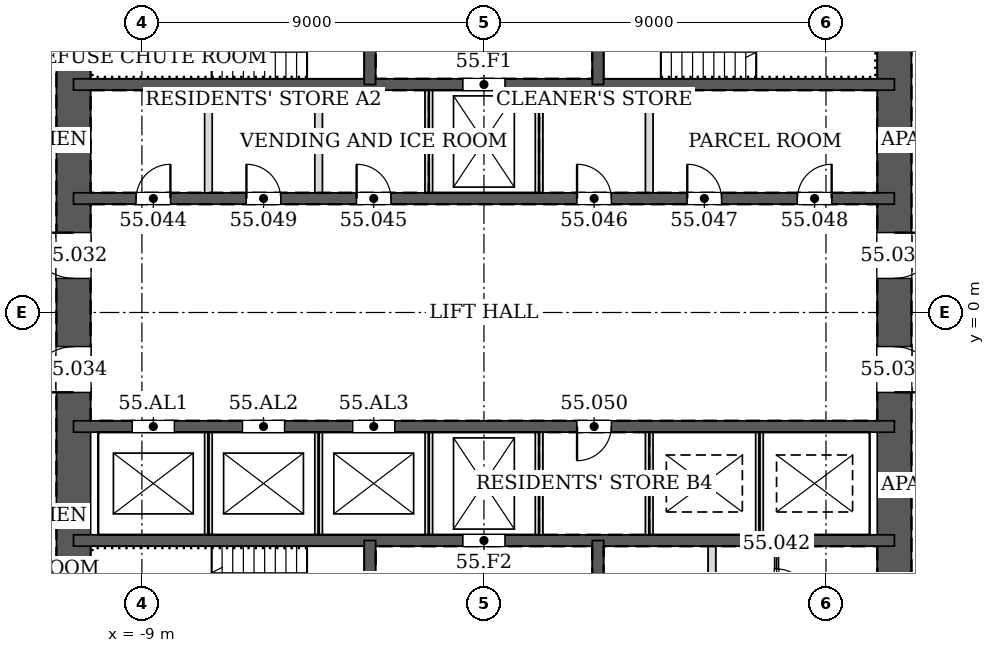
"""IFC4 building model, lengths in metres.
Left out: names, types, materials, properties, quantities, classifications, styles, units other than length and angle.
Written with IfcOpenShell. Run it as: python <this file> out.ifc"""

import sys

from ifc_helpers import new_model, si_unit, direction, frame, frame_2d, origin, place, context, subcontext, project, spatial, rectangle, extrude, element, fill, save


model = new_model("IFC4")
c1 = context("Model", 3, precision=1e-05, world=origin(), true_north=direction((0.0, 1.0)))
c2 = subcontext(c1, "Body", "Model", "MODEL_VIEW")
j1 = project(units=[si_unit("LENGTHUNIT", "METRE"), si_unit("PLANEANGLEUNIT", "RADIAN")], contexts=[c1])
p1 = place(None, origin())
s1 = spatial("IfcSite", under=j1, at=p1, CompositionType="ELEMENT")
p2 = place(p1, origin())
s2 = spatial("IfcBuilding", under=s1, at=p2, CompositionType="ELEMENT")
p3 = place(p2, frame((0.0, 0.0, 234.6)))
s3 = spatial("IfcBuildingStorey", under=s2, at=p3, CompositionType="ELEMENT", Elevation=234.6)
p4 = place(p3, frame((10.8, -10.8, 0.0), z_axis=(0.0, 0.0, 1.0), x_axis=(0.0, 1.0, 0.0)))
e1 = element("IfcWall", 1, at=p4, inside=s3, PredefinedType="SOLIDWALL", context=c2, shape_type="SweptSolid", body=[
    extrude(rectangle(XDim=21.6, YDim=0.9, at=frame_2d((10.8, 0.0))), origin(), (0.0, 0.0, 1.0), 3.4),
])
p5 = place(p4, frame((11.7, 0.0, 0.0)))
e2 = element("IfcOpeningElement", 2, at=p5, cuts=e1, PredefinedType="OPENING", context=c2, shape_type="SweptSolid", body=[
    extrude(rectangle(XDim=1.2, YDim=2.1, at=frame_2d((0.6, 1.05))), frame((0.0, 0.46, 0.0), z_axis=(0.0, -1.0, 0.0), x_axis=(1.0, 0.0, 0.0)), (0.0, 0.0, 1.0), 0.92),
])
p6 = place(p4, frame((8.7, 0.0, 0.0)))
e3 = element("IfcOpeningElement", 3, at=p6, cuts=e1, PredefinedType="OPENING", context=c2, shape_type="SweptSolid", body=[
    extrude(rectangle(XDim=1.2, YDim=2.1, at=frame_2d((0.6, 1.05))), frame((0.0, 0.46, 0.0), z_axis=(0.0, -1.0, 0.0), x_axis=(1.0, 0.0, 0.0)), (0.0, 0.0, 1.0), 0.92),
])
p7 = place(p3, frame((-10.8, 10.8, 0.0), z_axis=(0.0, 0.0, 1.0), x_axis=(0.0, -1.0, 0.0)))
e4 = element("IfcWall", 4, at=p7, inside=s3, PredefinedType="SOLIDWALL", context=c2, shape_type="SweptSolid", body=[
    extrude(rectangle(XDim=21.6, YDim=0.9, at=frame_2d((10.8, 0.0))), origin(), (0.0, 0.0, 1.0), 3.4),
])
p8 = place(p7, frame((8.7, 0.0, 0.0)))
e5 = element("IfcOpeningElement", 5, at=p8, cuts=e4, PredefinedType="OPENING", context=c2, shape_type="SweptSolid", body=[
    extrude(rectangle(XDim=1.2, YDim=2.1, at=frame_2d((0.6, 1.05))), frame((0.0, 0.46, 0.0), z_axis=(0.0, -1.0, 0.0), x_axis=(1.0, 0.0, 0.0)), (0.0, 0.0, 1.0), 0.92),
])
p9 = place(p7, frame((11.7, 0.0, 0.0)))
e6 = element("IfcOpeningElement", 6, at=p9, cuts=e4, PredefinedType="OPENING", context=c2, shape_type="SweptSolid", body=[
    extrude(rectangle(XDim=1.2, YDim=2.1, at=frame_2d((0.6, 1.05))), frame((0.0, 0.46, 0.0), z_axis=(0.0, -1.0, 0.0), x_axis=(1.0, 0.0, 0.0)), (0.0, 0.0, 1.0), 0.92),
])
p10 = place(p3, frame((-10.8, 3.0, 0.0), z_axis=(0.0, 0.0, 1.0), x_axis=(1.0, 0.0, 0.0)))
e7 = element("IfcWall", 7, at=p10, inside=s3, PredefinedType="SOLIDWALL", context=c2, shape_type="SweptSolid", body=[
    extrude(rectangle(XDim=21.6, YDim=0.3, at=frame_2d((10.8, 0.0))), origin(), (0.0, 0.0, 1.0), 3.4),
])
p11 = place(p10, frame((1.65, 0.0, 0.0)))
e8 = element("IfcOpeningElement", 8, at=p11, cuts=e7, PredefinedType="OPENING", context=c2, shape_type="SweptSolid", body=[
    extrude(rectangle(XDim=0.9, YDim=2.1, at=frame_2d((0.45, 1.05))), frame((0.0, 0.16, 0.0), z_axis=(0.0, -1.0, 0.0), x_axis=(1.0, 0.0, 0.0)), (0.0, 0.0, 1.0), 0.32),
])
p12 = place(p10, frame((7.45, 0.0, 0.0)))
e9 = element("IfcOpeningElement", 9, at=p12, cuts=e7, PredefinedType="OPENING", context=c2, shape_type="SweptSolid", body=[
    extrude(rectangle(XDim=0.9, YDim=2.1, at=frame_2d((0.45, 1.05))), frame((0.0, 0.16, 0.0), z_axis=(0.0, -1.0, 0.0), x_axis=(1.0, 0.0, 0.0)), (0.0, 0.0, 1.0), 0.32),
])
p13 = place(p10, frame((13.25, 0.0, 0.0)))
e10 = element("IfcOpeningElement", 10, at=p13, cuts=e7, PredefinedType="OPENING", context=c2, shape_type="SweptSolid", body=[
    extrude(rectangle(XDim=0.9, YDim=2.1, at=frame_2d((0.45, 1.05))), frame((0.0, 0.16, 0.0), z_axis=(0.0, -1.0, 0.0), x_axis=(1.0, 0.0, 0.0)), (0.0, 0.0, 1.0), 0.32),
])
p14 = place(p10, frame((16.15, 0.0, 0.0)))
e11 = element("IfcOpeningElement", 11, at=p14, cuts=e7, PredefinedType="OPENING", context=c2, shape_type="SweptSolid", body=[
    extrude(rectangle(XDim=0.9, YDim=2.1, at=frame_2d((0.45, 1.05))), frame((0.0, 0.16, 0.0), z_axis=(0.0, -1.0, 0.0), x_axis=(1.0, 0.0, 0.0)), (0.0, 0.0, 1.0), 0.32),
])
p15 = place(p10, frame((19.05, 0.0, 0.0)))
e12 = element("IfcOpeningElement", 12, at=p15, cuts=e7, PredefinedType="OPENING", context=c2, shape_type="SweptSolid", body=[
    extrude(rectangle(XDim=0.9, YDim=2.1, at=frame_2d((0.45, 1.05))), frame((0.0, 0.16, 0.0), z_axis=(0.0, -1.0, 0.0), x_axis=(1.0, 0.0, 0.0)), (0.0, 0.0, 1.0), 0.32),
])
p16 = place(p10, frame((4.55, 0.0, 0.0)))
e13 = element("IfcOpeningElement", 13, at=p16, cuts=e7, PredefinedType="OPENING", context=c2, shape_type="SweptSolid", body=[
    extrude(rectangle(XDim=0.9, YDim=2.1, at=frame_2d((0.45, 1.05))), frame((0.0, 0.16, 0.0), z_axis=(0.0, -1.0, 0.0), x_axis=(1.0, 0.0, 0.0)), (0.0, 0.0, 1.0), 0.32),
])
p17 = place(p3, frame((-10.8, 6.0, 0.0), z_axis=(0.0, 0.0, 1.0), x_axis=(1.0, 0.0, 0.0)))
e14 = element("IfcWall", 14, at=p17, inside=s3, PredefinedType="SOLIDWALL", context=c2, shape_type="SweptSolid", body=[
    extrude(rectangle(XDim=21.6, YDim=0.3, at=frame_2d((10.8, 0.0))), origin(), (0.0, 0.0, 1.0), 3.4),
])
p18 = place(p17, frame((10.25, 0.0, 0.0)))
e15 = element("IfcOpeningElement", 15, at=p18, cuts=e14, PredefinedType="OPENING", context=c2, shape_type="SweptSolid", body=[
    extrude(rectangle(XDim=1.1, YDim=2.1, at=frame_2d((0.55, 1.05))), frame((0.0, 0.16, 0.0), z_axis=(0.0, -1.0, 0.0), x_axis=(1.0, 0.0, 0.0)), (0.0, 0.0, 1.0), 0.32),
])
p19 = place(p3, frame((-3.0, 6.0, 0.0), z_axis=(0.0, 0.0, 1.0), x_axis=(0.0, 1.0, 0.0)))
e16 = element("IfcWall", 16, at=p19, inside=s3, PredefinedType="SOLIDWALL", context=c2, shape_type="SweptSolid", body=[
    extrude(rectangle(XDim=4.8, YDim=0.3, at=frame_2d((2.4, 0.0))), origin(), (0.0, 0.0, 1.0), 3.4),
])
p20 = place(p19, frame((1.75, 0.0, 0.0)))
e17 = element("IfcOpeningElement", 17, at=p20, cuts=e16, PredefinedType="OPENING", context=c2, shape_type="SweptSolid", body=[
    extrude(rectangle(XDim=1.0, YDim=2.1, at=frame_2d((0.5, 1.05))), frame((0.0, 0.16, 0.0), z_axis=(0.0, -1.0, 0.0), x_axis=(1.0, 0.0, 0.0)), (0.0, 0.0, 1.0), 0.32),
])
p21 = place(p3, frame((3.0, 6.0, 0.0), z_axis=(0.0, 0.0, 1.0), x_axis=(0.0, 1.0, 0.0)))
e18 = element("IfcWall", 18, at=p21, inside=s3, PredefinedType="SOLIDWALL", context=c2, shape_type="SweptSolid", body=[
    extrude(rectangle(XDim=4.8, YDim=0.3, at=frame_2d((2.4, 0.0))), origin(), (0.0, 0.0, 1.0), 3.4),
])
p22 = place(p21, frame((1.75, 0.0, 0.0)))
e19 = element("IfcOpeningElement", 19, at=p22, cuts=e18, PredefinedType="OPENING", context=c2, shape_type="SweptSolid", body=[
    extrude(rectangle(XDim=1.0, YDim=2.1, at=frame_2d((0.5, 1.05))), frame((0.0, 0.16, 0.0), z_axis=(0.0, -1.0, 0.0), x_axis=(1.0, 0.0, 0.0)), (0.0, 0.0, 1.0), 0.32),
])
p23 = place(p3, frame((-10.8, -3.0, 0.0), z_axis=(0.0, 0.0, 1.0), x_axis=(1.0, 0.0, 0.0)))
e20 = element("IfcWall", 20, at=p23, inside=s3, PredefinedType="SOLIDWALL", context=c2, shape_type="SweptSolid", body=[
    extrude(rectangle(XDim=21.6, YDim=0.3, at=frame_2d((10.8, 0.0))), origin(), (0.0, 0.0, 1.0), 3.4),
])
p24 = place(p23, frame((13.25, 0.0, 0.0)))
e21 = element("IfcOpeningElement", 21, at=p24, cuts=e20, PredefinedType="OPENING", context=c2, shape_type="SweptSolid", body=[
    extrude(rectangle(XDim=0.9, YDim=2.1, at=frame_2d((0.45, 1.05))), frame((0.0, 0.16, 0.0), z_axis=(0.0, -1.0, 0.0), x_axis=(1.0, 0.0, 0.0)), (0.0, 0.0, 1.0), 0.32),
])
p25 = place(p23, frame((1.55, 0.0, 0.0)))
e22 = element("IfcOpeningElement", 22, at=p25, cuts=e20, PredefinedType="OPENING", context=c2, shape_type="SweptSolid", body=[
    extrude(rectangle(XDim=1.1, YDim=2.1, at=frame_2d((0.55, 1.05))), frame((0.0, 0.16, 0.0), z_axis=(0.0, -1.0, 0.0), x_axis=(1.0, 0.0, 0.0)), (0.0, 0.0, 1.0), 0.32),
])
p26 = place(p23, frame((4.45, 0.0, 0.0)))
e23 = element("IfcOpeningElement", 23, at=p26, cuts=e20, PredefinedType="OPENING", context=c2, shape_type="SweptSolid", body=[
    extrude(rectangle(XDim=1.1, YDim=2.1, at=frame_2d((0.55, 1.05))), frame((0.0, 0.16, 0.0), z_axis=(0.0, -1.0, 0.0), x_axis=(1.0, 0.0, 0.0)), (0.0, 0.0, 1.0), 0.32),
])
p27 = place(p23, frame((7.35, 0.0, 0.0)))
e24 = element("IfcOpeningElement", 24, at=p27, cuts=e20, PredefinedType="OPENING", context=c2, shape_type="SweptSolid", body=[
    extrude(rectangle(XDim=1.1, YDim=2.1, at=frame_2d((0.55, 1.05))), frame((0.0, 0.16, 0.0), z_axis=(0.0, -1.0, 0.0), x_axis=(1.0, 0.0, 0.0)), (0.0, 0.0, 1.0), 0.32),
])
p28 = place(p3, frame((-10.8, -6.0, 0.0), z_axis=(0.0, 0.0, 1.0), x_axis=(1.0, 0.0, 0.0)))
e25 = element("IfcWall", 25, at=p28, inside=s3, PredefinedType="SOLIDWALL", context=c2, shape_type="SweptSolid", body=[
    extrude(rectangle(XDim=21.6, YDim=0.3, at=frame_2d((10.8, 0.0))), origin(), (0.0, 0.0, 1.0), 3.4),
])
p29 = place(p28, frame((10.25, 0.0, 0.0)))
e26 = element("IfcOpeningElement", 26, at=p29, cuts=e25, PredefinedType="OPENING", context=c2, shape_type="SweptSolid", body=[
    extrude(rectangle(XDim=1.1, YDim=2.1, at=frame_2d((0.55, 1.05))), frame((0.0, 0.16, 0.0), z_axis=(0.0, -1.0, 0.0), x_axis=(1.0, 0.0, 0.0)), (0.0, 0.0, 1.0), 0.32),
])
p30 = place(p3, frame((-3.0, -6.0, 0.0), z_axis=(0.0, 0.0, 1.0), x_axis=(0.0, -1.0, 0.0)))
e27 = element("IfcWall", 27, at=p30, inside=s3, PredefinedType="SOLIDWALL", context=c2, shape_type="SweptSolid", body=[
    extrude(rectangle(XDim=4.8, YDim=0.3, at=frame_2d((2.4, 0.0))), origin(), (0.0, 0.0, 1.0), 3.4),
])
p31 = place(p30, frame((1.75, 0.0, 0.0)))
e28 = element("IfcOpeningElement", 28, at=p31, cuts=e27, PredefinedType="OPENING", context=c2, shape_type="SweptSolid", body=[
    extrude(rectangle(XDim=1.0, YDim=2.1, at=frame_2d((0.5, 1.05))), frame((0.0, 0.16, 0.0), z_axis=(0.0, -1.0, 0.0), x_axis=(1.0, 0.0, 0.0)), (0.0, 0.0, 1.0), 0.32),
])
p32 = place(p3, frame((3.0, -6.0, 0.0), z_axis=(0.0, 0.0, 1.0), x_axis=(0.0, -1.0, 0.0)))
e29 = element("IfcWall", 29, at=p32, inside=s3, PredefinedType="SOLIDWALL", context=c2, shape_type="SweptSolid", body=[
    extrude(rectangle(XDim=4.8, YDim=0.3, at=frame_2d((2.4, 0.0))), origin(), (0.0, 0.0, 1.0), 3.4),
])
for number, where, z_axis, x_axis in (
    (30, (-7.25, 3.15, 0.0), (0.0, 0.0, 1.0), (0.0, 1.0, 0.0)),
    (31, (-4.35, 3.15, 0.0), (0.0, 0.0, 1.0), (0.0, 1.0, 0.0)),
    (32, (-1.45, 3.15, 0.0), (0.0, 0.0, 1.0), (0.0, 1.0, 0.0)),
    (33, (1.45, 3.15, 0.0), (0.0, 0.0, 1.0), (0.0, 1.0, 0.0)),
    (34, (4.35, 3.15, 0.0), (0.0, 0.0, 1.0), (0.0, 1.0, 0.0)),
):
    element("IfcWall", number, at=place(p3, frame(where, z_axis=z_axis, x_axis=x_axis)), inside=s3, PredefinedType="PARTITIONING", context=c2, shape_type="SweptSolid", body=[
        extrude(rectangle(XDim=2.7, YDim=0.2, at=frame_2d((1.35, 0.0))), origin(), (0.0, 0.0, 1.0), 3.2),
    ])
for number, where, z_axis, x_axis in (
    (35, (-7.25, -5.85, 0.0), (0.0, 0.0, 1.0), (0.0, 1.0, 0.0)),
    (36, (-4.35, -5.85, 0.0), (0.0, 0.0, 1.0), (0.0, 1.0, 0.0)),
    (37, (-1.45, -5.85, 0.0), (0.0, 0.0, 1.0), (0.0, 1.0, 0.0)),
):
    element("IfcWall", number, at=place(p3, frame(where, z_axis=z_axis, x_axis=x_axis)), inside=s3, PredefinedType="PARTITIONING", context=c2, shape_type="SweptSolid", body=[
        extrude(rectangle(XDim=2.7, YDim=0.2, at=frame_2d((1.35, 0.0))), origin(), (0.0, 0.0, 1.0), 3.4),
    ])
for number, where, z_axis, x_axis in (
    (38, (1.45, -5.85, 0.0), (0.0, 0.0, 1.0), (0.0, 1.0, 0.0)),
    (39, (4.35, -5.85, 0.0), (0.0, 0.0, 1.0), (0.0, 1.0, 0.0)),
):
    element("IfcWall", number, at=place(p3, frame(where, z_axis=z_axis, x_axis=x_axis)), inside=s3, PredefinedType="PARTITIONING", context=c2, shape_type="SweptSolid", body=[
        extrude(rectangle(XDim=2.7, YDim=0.2, at=frame_2d((1.35, 0.0))), origin(), (0.0, 0.0, 1.0), 3.2),
    ])
p33 = place(p3, frame((7.25, -5.85, 0.0), z_axis=(0.0, 0.0, 1.0), x_axis=(0.0, 1.0, 0.0)))
e40 = element("IfcWall", 40, at=p33, inside=s3, PredefinedType="PARTITIONING", context=c2, shape_type="SweptSolid", body=[
    extrude(rectangle(XDim=2.7, YDim=0.2, at=frame_2d((1.35, 0.0))), origin(), (0.0, 0.0, 1.0), 3.4),
])
p34 = place(p3, frame((6.0, -10.35, 0.0), z_axis=(0.0, 0.0, 1.0), x_axis=(0.0, 1.0, 0.0)))
e41 = element("IfcWall", 41, at=p34, inside=s3, PredefinedType="PARTITIONING", context=c2, shape_type="SweptSolid", body=[
    extrude(rectangle(XDim=4.2, YDim=0.2, at=frame_2d((2.1, 0.0))), origin(), (0.0, 0.0, 1.0), 3.2),
])
p35 = place(p34, frame((0.3, 0.0, 0.0)))
e42 = element("IfcOpeningElement", 42, at=p35, cuts=e41, PredefinedType="OPENING", context=c2, shape_type="SweptSolid", body=[
    extrude(rectangle(XDim=0.9, YDim=2.1, at=frame_2d((0.45, 1.05))), frame((0.0, 0.11, 0.0), z_axis=(0.0, -1.0, 0.0), x_axis=(1.0, 0.0, 0.0)), (0.0, 0.0, 1.0), 0.22),
])
p36 = place(p3, frame((7.7, -10.35, 0.0), z_axis=(0.0, 0.0, 1.0), x_axis=(0.0, 1.0, 0.0)))
e43 = element("IfcWall", 43, at=p36, inside=s3, PredefinedType="PARTITIONING", context=c2, shape_type="SweptSolid", body=[
    extrude(rectangle(XDim=4.2, YDim=0.1, at=frame_2d((2.1, 0.0))), origin(), (0.0, 0.0, 1.0), 3.2),
])
p37 = place(p36, frame((2.7, 0.0, 0.0)))
e44 = element("IfcOpeningElement", 44, at=p37, cuts=e43, PredefinedType="OPENING", context=c2, shape_type="SweptSolid", body=[
    extrude(rectangle(XDim=0.9, YDim=2.1, at=frame_2d((0.45, 1.05))), frame((0.0, 0.06, 0.0), z_axis=(0.0, -1.0, 0.0), x_axis=(1.0, 0.0, 0.0)), (0.0, 0.0, 1.0), 0.12),
])
p38 = place(p36, frame((0.6, 0.0, 0.0)))
e45 = element("IfcOpeningElement", 45, at=p38, cuts=e43, PredefinedType="OPENING", context=c2, shape_type="SweptSolid", body=[
    extrude(rectangle(XDim=0.9, YDim=2.1, at=frame_2d((0.45, 1.05))), frame((0.0, 0.06, 0.0), z_axis=(0.0, -1.0, 0.0), x_axis=(1.0, 0.0, 0.0)), (0.0, 0.0, 1.0), 0.12),
])
p39 = place(p5, frame((1.2, 0.0, 0.0), z_axis=(0.0, 0.0, 1.0), x_axis=(-1.0, 0.0, 0.0)))
e46 = element("IfcDoor", 46, at=p39, inside=s3, OperationType="SINGLE_SWING_LEFT", PredefinedType="DOOR", context=c2, shape_type="SweptSolid", body=[
    extrude(rectangle(XDim=1.2, YDim=2.1, at=frame_2d((0.6, 1.05))), frame((0.0, 0.025, 0.0), z_axis=(0.0, -1.0, 0.0), x_axis=(1.0, 0.0, 0.0)), (0.0, 0.0, 1.0), 0.05),
])
fill(e2, e46)
p40 = place(p8, frame((1.2, 0.0, 0.0), z_axis=(0.0, 0.0, 1.0), x_axis=(-1.0, 0.0, 0.0)))
e47 = element("IfcDoor", 47, at=p40, inside=s3, OperationType="SINGLE_SWING_RIGHT", PredefinedType="DOOR", context=c2, shape_type="SweptSolid", body=[
    extrude(rectangle(XDim=1.2, YDim=2.1, at=frame_2d((0.6, 1.05))), frame((0.0, 0.025, 0.0), z_axis=(0.0, -1.0, 0.0), x_axis=(1.0, 0.0, 0.0)), (0.0, 0.0, 1.0), 0.05),
])
fill(e5, e47)
p41 = place(p6, frame((1.2, 0.0, 0.0), z_axis=(0.0, 0.0, 1.0), x_axis=(-1.0, 0.0, 0.0)))
e48 = element("IfcDoor", 48, at=p41, inside=s3, OperationType="SINGLE_SWING_RIGHT", PredefinedType="DOOR", context=c2, shape_type="SweptSolid", body=[
    extrude(rectangle(XDim=1.2, YDim=2.1, at=frame_2d((0.6, 1.05))), frame((0.0, 0.025, 0.0), z_axis=(0.0, -1.0, 0.0), x_axis=(1.0, 0.0, 0.0)), (0.0, 0.0, 1.0), 0.05),
])
fill(e3, e48)
p42 = place(p9, frame((1.2, 0.0, 0.0), z_axis=(0.0, 0.0, 1.0), x_axis=(-1.0, 0.0, 0.0)))
e49 = element("IfcDoor", 49, at=p42, inside=s3, OperationType="SINGLE_SWING_LEFT", PredefinedType="DOOR", context=c2, shape_type="SweptSolid", body=[
    extrude(rectangle(XDim=1.2, YDim=2.1, at=frame_2d((0.6, 1.05))), frame((0.0, 0.025, 0.0), z_axis=(0.0, -1.0, 0.0), x_axis=(1.0, 0.0, 0.0)), (0.0, 0.0, 1.0), 0.05),
])
fill(e6, e49)
p43 = place(p37, frame((0.9, 0.0, 0.0), z_axis=(0.0, 0.0, 1.0), x_axis=(-1.0, 0.0, 0.0)))
e50 = element("IfcDoor", 50, at=p43, inside=s3, OperationType="SINGLE_SWING_RIGHT", PredefinedType="DOOR", context=c2, shape_type="SweptSolid", body=[
    extrude(rectangle(XDim=0.9, YDim=2.1, at=frame_2d((0.45, 1.05))), frame((0.0, 0.025, 0.0), z_axis=(0.0, -1.0, 0.0), x_axis=(1.0, 0.0, 0.0)), (0.0, 0.0, 1.0), 0.05),
])
fill(e44, e50)
p44 = place(p11, origin())
e51 = element("IfcDoor", 51, at=p44, inside=s3, OperationType="SINGLE_SWING_RIGHT", PredefinedType="DOOR", context=c2, shape_type="SweptSolid", body=[
    extrude(rectangle(XDim=0.9, YDim=2.1, at=frame_2d((0.45, 1.05))), frame((0.0, 0.025, 0.0), z_axis=(0.0, -1.0, 0.0), x_axis=(1.0, 0.0, 0.0)), (0.0, 0.0, 1.0), 0.05),
])
fill(e8, e51)
p45 = place(p12, origin())
e52 = element("IfcDoor", 52, at=p45, inside=s3, OperationType="SINGLE_SWING_LEFT", PredefinedType="DOOR", context=c2, shape_type="SweptSolid", body=[
    extrude(rectangle(XDim=0.9, YDim=2.1, at=frame_2d((0.45, 1.05))), frame((0.0, 0.025, 0.0), z_axis=(0.0, -1.0, 0.0), x_axis=(1.0, 0.0, 0.0)), (0.0, 0.0, 1.0), 0.05),
])
fill(e9, e52)
p46 = place(p13, origin())
e53 = element("IfcDoor", 53, at=p46, inside=s3, OperationType="SINGLE_SWING_LEFT", PredefinedType="DOOR", context=c2, shape_type="SweptSolid", body=[
    extrude(rectangle(XDim=0.9, YDim=2.1, at=frame_2d((0.45, 1.05))), frame((0.0, 0.025, 0.0), z_axis=(0.0, -1.0, 0.0), x_axis=(1.0, 0.0, 0.0)), (0.0, 0.0, 1.0), 0.05),
])
fill(e10, e53)
p47 = place(p14, origin())
e54 = element("IfcDoor", 54, at=p47, inside=s3, OperationType="SINGLE_SWING_LEFT", PredefinedType="DOOR", context=c2, shape_type="SweptSolid", body=[
    extrude(rectangle(XDim=0.9, YDim=2.1, at=frame_2d((0.45, 1.05))), frame((0.0, 0.025, 0.0), z_axis=(0.0, -1.0, 0.0), x_axis=(1.0, 0.0, 0.0)), (0.0, 0.0, 1.0), 0.05),
])
fill(e11, e54)
p48 = place(p15, origin())
e55 = element("IfcDoor", 55, at=p48, inside=s3, OperationType="SINGLE_SWING_RIGHT", PredefinedType="DOOR", context=c2, shape_type="SweptSolid", body=[
    extrude(rectangle(XDim=0.9, YDim=2.1, at=frame_2d((0.45, 1.05))), frame((0.0, 0.025, 0.0), z_axis=(0.0, -1.0, 0.0), x_axis=(1.0, 0.0, 0.0)), (0.0, 0.0, 1.0), 0.05),
])
fill(e12, e55)
p49 = place(p16, origin())
e56 = element("IfcDoor", 56, at=p49, inside=s3, OperationType="SINGLE_SWING_LEFT", PredefinedType="DOOR", context=c2, shape_type="SweptSolid", body=[
    extrude(rectangle(XDim=0.9, YDim=2.1, at=frame_2d((0.45, 1.05))), frame((0.0, 0.025, 0.0), z_axis=(0.0, -1.0, 0.0), x_axis=(1.0, 0.0, 0.0)), (0.0, 0.0, 1.0), 0.05),
])
fill(e13, e56)
p50 = place(p24, frame((0.9, 0.0, 0.0), z_axis=(0.0, 0.0, 1.0), x_axis=(-1.0, 0.0, 0.0)))
e57 = element("IfcDoor", 57, at=p50, inside=s3, OperationType="SINGLE_SWING_RIGHT", PredefinedType="DOOR", context=c2, shape_type="SweptSolid", body=[
    extrude(rectangle(XDim=0.9, YDim=2.1, at=frame_2d((0.45, 1.05))), frame((0.0, 0.025, 0.0), z_axis=(0.0, -1.0, 0.0), x_axis=(1.0, 0.0, 0.0)), (0.0, 0.0, 1.0), 0.05),
])
fill(e21, e57)
p51 = place(p18, origin())
e58 = element("IfcDoor", 58, at=p51, inside=s3, OperationType="DOUBLE_DOOR_SLIDING", PredefinedType="DOOR", context=c2, shape_type="SweptSolid", body=[
    extrude(rectangle(XDim=1.1, YDim=2.1, at=frame_2d((0.55, 1.05))), frame((0.0, 0.025, 0.0), z_axis=(0.0, -1.0, 0.0), x_axis=(1.0, 0.0, 0.0)), (0.0, 0.0, 1.0), 0.05),
])
fill(e15, e58)
p52 = place(p29, origin())
e59 = element("IfcDoor", 59, at=p52, inside=s3, OperationType="DOUBLE_DOOR_SLIDING", PredefinedType="DOOR", context=c2, shape_type="SweptSolid", body=[
    extrude(rectangle(XDim=1.1, YDim=2.1, at=frame_2d((0.55, 1.05))), frame((0.0, 0.025, 0.0), z_axis=(0.0, -1.0, 0.0), x_axis=(1.0, 0.0, 0.0)), (0.0, 0.0, 1.0), 0.05),
])
fill(e26, e59)
p53 = place(p25, origin())
e60 = element("IfcDoor", 60, at=p53, inside=s3, OperationType="DOUBLE_DOOR_SLIDING", PredefinedType="DOOR", context=c2, shape_type="SweptSolid", body=[
    extrude(rectangle(XDim=1.1, YDim=2.1, at=frame_2d((0.55, 1.05))), frame((0.0, 0.025, 0.0), z_axis=(0.0, -1.0, 0.0), x_axis=(1.0, 0.0, 0.0)), (0.0, 0.0, 1.0), 0.05),
])
fill(e22, e60)
p54 = place(p26, origin())
e61 = element("IfcDoor", 61, at=p54, inside=s3, OperationType="DOUBLE_DOOR_SLIDING", PredefinedType="DOOR", context=c2, shape_type="SweptSolid", body=[
    extrude(rectangle(XDim=1.1, YDim=2.1, at=frame_2d((0.55, 1.05))), frame((0.0, 0.025, 0.0), z_axis=(0.0, -1.0, 0.0), x_axis=(1.0, 0.0, 0.0)), (0.0, 0.0, 1.0), 0.05),
])
fill(e23, e61)
p55 = place(p27, origin())
e62 = element("IfcDoor", 62, at=p55, inside=s3, OperationType="DOUBLE_DOOR_SLIDING", PredefinedType="DOOR", context=c2, shape_type="SweptSolid", body=[
    extrude(rectangle(XDim=1.1, YDim=2.1, at=frame_2d((0.55, 1.05))), frame((0.0, 0.025, 0.0), z_axis=(0.0, -1.0, 0.0), x_axis=(1.0, 0.0, 0.0)), (0.0, 0.0, 1.0), 0.05),
])
fill(e24, e62)
save(model, sys.argv[1])
